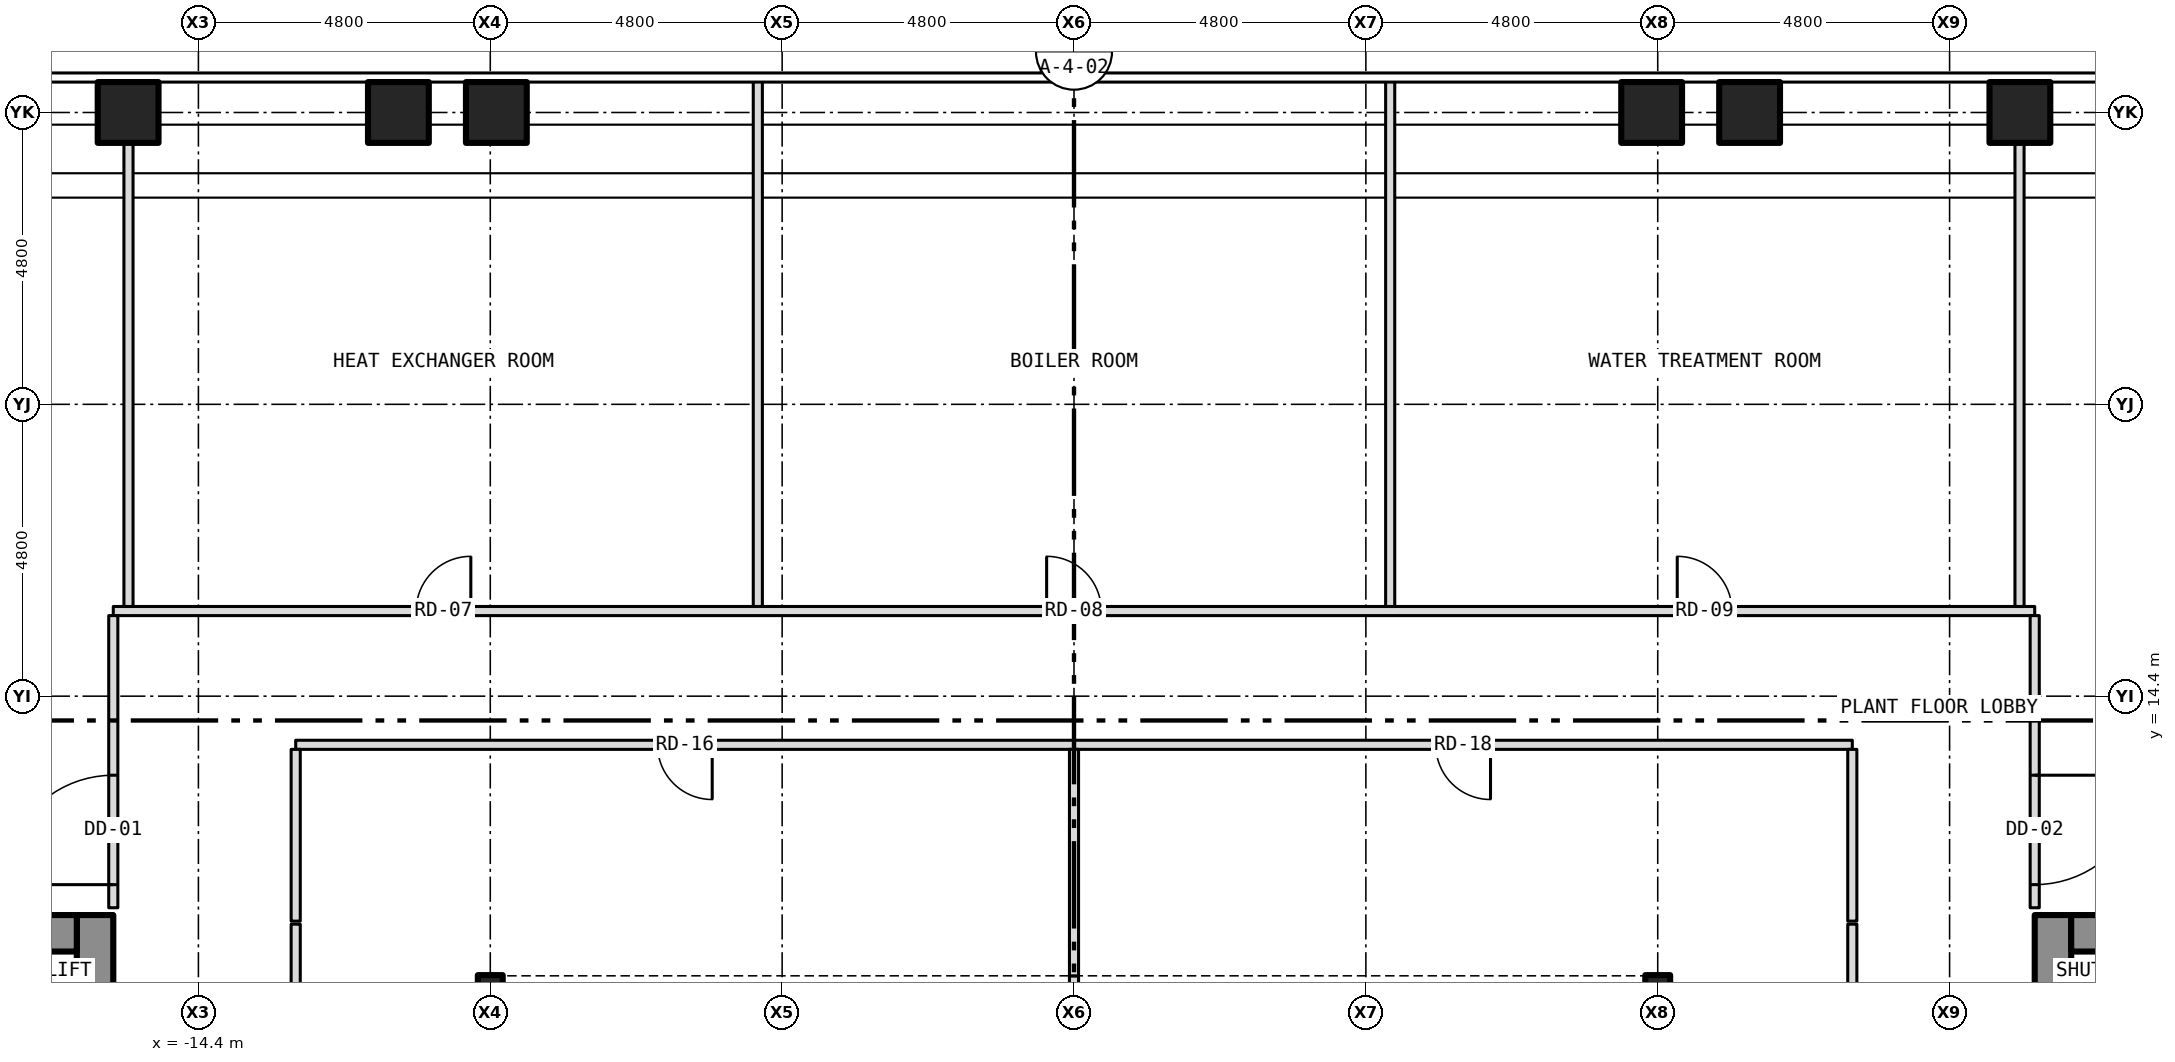
"""IFC4 building model, lengths in metres.
Left out: names, types, materials, properties, quantities, classifications, styles, units other than length and angle.
Written with IfcOpenShell. Run it as: python <this file> out.ifc"""

import sys

from ifc_helpers import new_model, si_unit, direction, frame, frame_2d, origin, origin_2d, place, context, subcontext, project, spatial, rectangle, hollow_rectangle, i_section, extrude, element, fill, save


model = new_model("IFC4")
c1 = context("Model", 3, precision=1e-05, world=origin(), true_north=direction((0.0, 1.0)))
c2 = subcontext(c1, "Body", "Model", "MODEL_VIEW")
j1 = project(units=[si_unit("LENGTHUNIT", "METRE"), si_unit("PLANEANGLEUNIT", "RADIAN")], contexts=[c1])
p1 = place(None, origin())
s1 = spatial("IfcSite", under=j1, at=p1, CompositionType="ELEMENT")
p2 = place(p1, origin())
s2 = spatial("IfcBuilding", under=s1, at=p2, CompositionType="ELEMENT")
p3 = place(p2, frame((0.0, 0.0, 84.5)))
s3 = spatial("IfcBuildingStorey", under=s2, at=p3, CompositionType="ELEMENT", Elevation=84.5)
for number, where, z_axis, x_axis in (
    (1, (-15.556, 24.0, -0.3), (0.0, 0.0, 1.0), (1.0, 0.0, 0.0)),
    (2, (-11.111, 24.0, -0.3), (0.0, 0.0, 1.0), (1.0, 0.0, 0.0)),
    (3, (11.111, 24.0, -0.3), (0.0, 0.0, 1.0), (1.0, 0.0, 0.0)),
    (4, (15.556, 24.0, -0.3), (0.0, 0.0, 1.0), (1.0, 0.0, 0.0)),
    (5, (-9.5, 24.0, -0.3), (0.0, 0.0, 1.0), (1.0, 0.0, 0.0)),
    (6, (9.5, 24.0, -0.3), (0.0, 0.0, 1.0), (1.0, 0.0, 0.0)),
):
    element("IfcColumn", number, at=place(p3, frame(where, z_axis=z_axis, x_axis=x_axis)), inside=s3, PredefinedType="COLUMN", context=c2, shape_type="SweptSolid", body=[
        extrude(hollow_rectangle(XDim=1.0, YDim=1.0, WallThickness=0.06, at=origin_2d()), origin(), (0.0, 0.0, 1.0), 4.65),
    ])
for number, where, z_axis, x_axis in (
    (7, (-9.6, 9.6, -0.3), (0.0, 0.0, 1.0), (1.0, 0.0, 0.0)),
    (8, (9.6, 9.6, -0.3), (0.0, 0.0, 1.0), (1.0, 0.0, 0.0)),
):
    element("IfcColumn", number, at=place(p3, frame(where, z_axis=z_axis, x_axis=x_axis)), inside=s3, PredefinedType="COLUMN", context=c2, shape_type="SweptSolid", body=[
        extrude(i_section(OverallWidth=0.409, OverallDepth=0.424, WebThickness=0.033, FlangeThickness=0.052, at=origin_2d()), origin(), (0.0, 0.0, 1.0), 4.65),
    ])
p4 = place(p3, frame((16.1, -10.8, 0.0), z_axis=(0.0, 0.0, 1.0), x_axis=(0.0, 1.0, 0.0)))
e9 = element("IfcWall", 9, at=p4, inside=s3, PredefinedType="SHEAR", context=c2, shape_type="SweptSolid", body=[
    extrude(rectangle(XDim=21.6, YDim=0.6, at=frame_2d((10.8, 0.0))), origin(), (0.0, 0.0, 1.0), 3.9),
])
p5 = place(p4, frame((9.4, 0.0, 0.0)))
e10 = element("IfcOpeningElement", 10, at=p5, cuts=e9, PredefinedType="OPENING", context=c2, shape_type="SweptSolid", body=[
    extrude(rectangle(XDim=1.1, YDim=2.1, at=frame_2d((0.55, 1.05))), frame((0.0, 0.312, 0.0), z_axis=(0.0, -1.0, 0.0), x_axis=(1.0, 0.0, 0.0)), (0.0, 0.0, 1.0), 0.624),
])
p6 = place(p4, frame((11.5, 0.0, 0.0)))
e11 = element("IfcOpeningElement", 11, at=p6, cuts=e9, PredefinedType="OPENING", context=c2, shape_type="SweptSolid", body=[
    extrude(rectangle(XDim=1.1, YDim=2.1, at=frame_2d((0.55, 1.05))), frame((0.0, 0.312, 0.0), z_axis=(0.0, -1.0, 0.0), x_axis=(1.0, 0.0, 0.0)), (0.0, 0.0, 1.0), 0.624),
])
p7 = place(p4, frame((13.6, 0.0, 0.0)))
e12 = element("IfcOpeningElement", 12, at=p7, cuts=e9, PredefinedType="OPENING", context=c2, shape_type="SweptSolid", body=[
    extrude(rectangle(XDim=1.1, YDim=2.1, at=frame_2d((0.55, 1.05))), frame((0.0, 0.312, 0.0), z_axis=(0.0, -1.0, 0.0), x_axis=(1.0, 0.0, 0.0)), (0.0, 0.0, 1.0), 0.624),
])
p8 = place(p4, frame((15.7, 0.0, 0.0)))
e13 = element("IfcOpeningElement", 13, at=p8, cuts=e9, PredefinedType="OPENING", context=c2, shape_type="SweptSolid", body=[
    extrude(rectangle(XDim=1.1, YDim=2.1, at=frame_2d((0.55, 1.05))), frame((0.0, 0.312, 0.0), z_axis=(0.0, -1.0, 0.0), x_axis=(1.0, 0.0, 0.0)), (0.0, 0.0, 1.0), 0.624),
])
p9 = place(p4, frame((17.8, 0.0, 0.0)))
e14 = element("IfcOpeningElement", 14, at=p9, cuts=e9, PredefinedType="OPENING", context=c2, shape_type="SweptSolid", body=[
    extrude(rectangle(XDim=1.1, YDim=2.1, at=frame_2d((0.55, 1.05))), frame((0.0, 0.312, 0.0), z_axis=(0.0, -1.0, 0.0), x_axis=(1.0, 0.0, 0.0)), (0.0, 0.0, 1.0), 0.624),
])
p10 = place(p4, frame((5.642, 0.0, 0.0)))
e15 = element("IfcOpeningElement", 15, at=p10, cuts=e9, PredefinedType="OPENING", context=c2, shape_type="SweptSolid", body=[
    extrude(rectangle(XDim=1.1, YDim=2.1, at=frame_2d((0.55, 1.05))), frame((0.0, 0.312, 0.0), z_axis=(0.0, -1.0, 0.0), x_axis=(1.0, 0.0, 0.0)), (0.0, 0.0, 1.0), 0.624),
])
p11 = place(p4, frame((7.5, 0.0, 0.0)))
e16 = element("IfcOpeningElement", 16, at=p11, cuts=e9, PredefinedType="OPENING", context=c2, shape_type="SweptSolid", body=[
    extrude(rectangle(XDim=1.1, YDim=2.1, at=frame_2d((0.55, 1.05))), frame((0.0, 0.312, 0.0), z_axis=(0.0, -1.0, 0.0), x_axis=(1.0, 0.0, 0.0)), (0.0, 0.0, 1.0), 0.624),
])
p12 = place(p3, frame((16.4, 10.5, 0.0), z_axis=(0.0, 0.0, 1.0), x_axis=(1.0, 0.0, 0.0)))
e17 = element("IfcWall", 17, at=p12, inside=s3, PredefinedType="SHEAR", context=c2, shape_type="SweptSolid", body=[
    extrude(rectangle(XDim=7.0, YDim=0.6, at=frame_2d((3.5, 0.0))), origin(), (0.0, 0.0, 1.0), 3.9),
])
p13 = place(p3, frame((-16.1, -10.8, 0.0), z_axis=(0.0, 0.0, 1.0), x_axis=(0.0, 1.0, 0.0)))
e18 = element("IfcWall", 18, at=p13, inside=s3, PredefinedType="SHEAR", context=c2, shape_type="SweptSolid", body=[
    extrude(rectangle(XDim=21.6, YDim=0.6, at=frame_2d((10.8, 0.0))), origin(), (0.0, 0.0, 1.0), 3.9),
])
p14 = place(p13, frame((9.4, 0.0, 0.0)))
e19 = element("IfcOpeningElement", 19, at=p14, cuts=e18, PredefinedType="OPENING", context=c2, shape_type="SweptSolid", body=[
    extrude(rectangle(XDim=1.1, YDim=2.1, at=frame_2d((0.55, 1.05))), frame((0.0, 0.312, 0.0), z_axis=(0.0, -1.0, 0.0), x_axis=(1.0, 0.0, 0.0)), (0.0, 0.0, 1.0), 0.624),
])
p15 = place(p13, frame((11.5, 0.0, 0.0)))
e20 = element("IfcOpeningElement", 20, at=p15, cuts=e18, PredefinedType="OPENING", context=c2, shape_type="SweptSolid", body=[
    extrude(rectangle(XDim=1.1, YDim=2.1, at=frame_2d((0.55, 1.05))), frame((0.0, 0.312, 0.0), z_axis=(0.0, -1.0, 0.0), x_axis=(1.0, 0.0, 0.0)), (0.0, 0.0, 1.0), 0.624),
])
p16 = place(p13, frame((13.6, 0.0, 0.0)))
e21 = element("IfcOpeningElement", 21, at=p16, cuts=e18, PredefinedType="OPENING", context=c2, shape_type="SweptSolid", body=[
    extrude(rectangle(XDim=1.1, YDim=2.1, at=frame_2d((0.55, 1.05))), frame((0.0, 0.312, 0.0), z_axis=(0.0, -1.0, 0.0), x_axis=(1.0, 0.0, 0.0)), (0.0, 0.0, 1.0), 0.624),
])
p17 = place(p13, frame((15.7, 0.0, 0.0)))
e22 = element("IfcOpeningElement", 22, at=p17, cuts=e18, PredefinedType="OPENING", context=c2, shape_type="SweptSolid", body=[
    extrude(rectangle(XDim=1.1, YDim=2.1, at=frame_2d((0.55, 1.05))), frame((0.0, 0.312, 0.0), z_axis=(0.0, -1.0, 0.0), x_axis=(1.0, 0.0, 0.0)), (0.0, 0.0, 1.0), 0.624),
])
p18 = place(p13, frame((17.8, 0.0, 0.0)))
e23 = element("IfcOpeningElement", 23, at=p18, cuts=e18, PredefinedType="OPENING", context=c2, shape_type="SweptSolid", body=[
    extrude(rectangle(XDim=1.1, YDim=2.1, at=frame_2d((0.55, 1.05))), frame((0.0, 0.312, 0.0), z_axis=(0.0, -1.0, 0.0), x_axis=(1.0, 0.0, 0.0)), (0.0, 0.0, 1.0), 0.624),
])
p19 = place(p13, frame((0.758, 0.0, 0.0)))
e24 = element("IfcOpeningElement", 24, at=p19, cuts=e18, PredefinedType="OPENING", context=c2, shape_type="SweptSolid", body=[
    extrude(rectangle(XDim=1.1, YDim=2.1, at=frame_2d((0.55, 1.05))), frame((0.0, 0.312, 0.0), z_axis=(0.0, -1.0, 0.0), x_axis=(1.0, 0.0, 0.0)), (0.0, 0.0, 1.0), 0.624),
])
p20 = place(p13, frame((7.5, 0.0, 0.0)))
e25 = element("IfcOpeningElement", 25, at=p20, cuts=e18, PredefinedType="OPENING", context=c2, shape_type="SweptSolid", body=[
    extrude(rectangle(XDim=1.1, YDim=2.1, at=frame_2d((0.55, 1.05))), frame((0.0, 0.312, 0.0), z_axis=(0.0, -1.0, 0.0), x_axis=(1.0, 0.0, 0.0)), (0.0, 0.0, 1.0), 0.624),
])
p21 = place(p3, frame((-23.4, 10.5, 0.0), z_axis=(0.0, 0.0, 1.0), x_axis=(1.0, 0.0, 0.0)))
e26 = element("IfcWall", 26, at=p21, inside=s3, PredefinedType="SHEAR", context=c2, shape_type="SweptSolid", body=[
    extrude(rectangle(XDim=7.0, YDim=0.6, at=frame_2d((3.5, 0.0))), origin(), (0.0, 0.0, 1.0), 3.9),
])
p22 = place(p3, frame((-12.8, 13.6, 0.0), z_axis=(0.0, 0.0, 1.0), x_axis=(1.0, 0.0, 0.0)))
e27 = element("IfcWall", 27, at=p22, inside=s3, PredefinedType="PARTITIONING", context=c2, shape_type="SweptSolid", body=[
    extrude(rectangle(XDim=25.6, YDim=0.15, at=frame_2d((12.8, 0.0))), origin(), (0.0, 0.0, 1.0), 4.35),
])
p23 = place(p22, frame((5.95, 0.0, 0.0)))
e28 = element("IfcOpeningElement", 28, at=p23, cuts=e27, PredefinedType="OPENING", context=c2, shape_type="SweptSolid", body=[
    extrude(rectangle(XDim=0.9, YDim=2.1, at=frame_2d((0.45, 1.05))), frame((0.0, 0.087, 0.0), z_axis=(0.0, -1.0, 0.0), x_axis=(1.0, 0.0, 0.0)), (0.0, 0.0, 1.0), 0.174),
])
p24 = place(p22, frame((18.75, 0.0, 0.0)))
e29 = element("IfcOpeningElement", 29, at=p24, cuts=e27, PredefinedType="OPENING", context=c2, shape_type="SweptSolid", body=[
    extrude(rectangle(XDim=0.9, YDim=2.1, at=frame_2d((0.45, 1.05))), frame((0.0, 0.087, 0.0), z_axis=(0.0, -1.0, 0.0), x_axis=(1.0, 0.0, 0.0)), (0.0, 0.0, 1.0), 0.174),
])
p25 = place(p3, frame((-15.8, 15.8, 0.0), z_axis=(0.0, 0.0, 1.0), x_axis=(1.0, 0.0, 0.0)))
e30 = element("IfcWall", 30, at=p25, inside=s3, PredefinedType="PARTITIONING", context=c2, shape_type="SweptSolid", body=[
    extrude(rectangle(XDim=31.6, YDim=0.15, at=frame_2d((15.8, 0.0))), origin(), (0.0, 0.0, 1.0), 4.35),
])
p26 = place(p25, frame((4.98, 0.0, 0.0)))
e31 = element("IfcOpeningElement", 31, at=p26, cuts=e30, PredefinedType="OPENING", context=c2, shape_type="SweptSolid", body=[
    extrude(rectangle(XDim=0.9, YDim=2.1, at=frame_2d((0.45, 1.05))), frame((0.0, 0.087, 0.0), z_axis=(0.0, -1.0, 0.0), x_axis=(1.0, 0.0, 0.0)), (0.0, 0.0, 1.0), 0.174),
])
p27 = place(p25, frame((15.35, 0.0, 0.0)))
e32 = element("IfcOpeningElement", 32, at=p27, cuts=e30, PredefinedType="OPENING", context=c2, shape_type="SweptSolid", body=[
    extrude(rectangle(XDim=0.9, YDim=2.1, at=frame_2d((0.45, 1.05))), frame((0.0, 0.087, 0.0), z_axis=(0.0, -1.0, 0.0), x_axis=(1.0, 0.0, 0.0)), (0.0, 0.0, 1.0), 0.174),
])
p28 = place(p25, frame((25.721, 0.0, 0.0)))
e33 = element("IfcOpeningElement", 33, at=p28, cuts=e30, PredefinedType="OPENING", context=c2, shape_type="SweptSolid", body=[
    extrude(rectangle(XDim=0.9, YDim=2.1, at=frame_2d((0.45, 1.05))), frame((0.0, 0.087, 0.0), z_axis=(0.0, -1.0, 0.0), x_axis=(1.0, 0.0, 0.0)), (0.0, 0.0, 1.0), 0.174),
])
p29 = place(p3, frame((-15.8, 10.92, 0.0), z_axis=(0.0, 0.0, 1.0), x_axis=(0.0, 1.0, 0.0)))
e34 = element("IfcWall", 34, at=p29, inside=s3, PredefinedType="PARTITIONING", context=c2, shape_type="SweptSolid", body=[
    extrude(rectangle(XDim=4.805, YDim=0.15, at=frame_2d((2.403, 0.0))), origin(), (0.0, 0.0, 1.0), 4.35),
])
p30 = place(p29, frame((0.38, 0.0, 0.0)))
e35 = element("IfcOpeningElement", 35, at=p30, cuts=e34, PredefinedType="OPENING", context=c2, shape_type="SweptSolid", body=[
    extrude(rectangle(XDim=1.8, YDim=2.1, at=frame_2d((0.9, 1.05))), frame((0.0, 0.087, 0.0), z_axis=(0.0, -1.0, 0.0), x_axis=(1.0, 0.0, 0.0)), (0.0, 0.0, 1.0), 0.174),
])
p31 = place(p3, frame((-15.55, 15.875, 0.0), z_axis=(0.0, 0.0, 1.0), x_axis=(0.0, 1.0, 0.0)))
e36 = element("IfcWall", 36, at=p31, inside=s3, PredefinedType="PARTITIONING", context=c2, shape_type="SweptSolid", body=[
    extrude(rectangle(XDim=8.005, YDim=0.15, at=frame_2d((4.002, 0.0))), origin(), (0.0, 0.0, 1.0), 4.35),
])
p32 = place(p3, frame((-12.8, 2.4, 0.0), z_axis=(0.0, 0.0, 1.0), x_axis=(0.0, 1.0, 0.0)))
e37 = element("IfcWall", 37, at=p32, inside=s3, PredefinedType="PARTITIONING", context=c2, shape_type="SweptSolid", body=[
    extrude(rectangle(XDim=8.25, YDim=0.15, at=frame_2d((4.125, 0.0))), origin(), (0.0, 0.0, 1.0), 4.35),
])
p33 = place(p3, frame((-12.8, 10.7, 0.0), z_axis=(0.0, 0.0, 1.0), x_axis=(0.0, 1.0, 0.0)))
e38 = element("IfcWall", 38, at=p33, inside=s3, PredefinedType="PARTITIONING", context=c2, shape_type="SweptSolid", body=[
    extrude(rectangle(XDim=2.825, YDim=0.15, at=frame_2d((1.413, 0.0))), origin(), (0.0, 0.0, 1.0), 4.35),
])
p34 = place(p3, frame((-5.2, 15.875, 0.0), z_axis=(0.0, 0.0, 1.0), x_axis=(0.0, 1.0, 0.0)))
e39 = element("IfcWall", 39, at=p34, inside=s3, PredefinedType="PARTITIONING", context=c2, shape_type="SweptSolid", body=[
    extrude(rectangle(XDim=8.655, YDim=0.15, at=frame_2d((4.328, 0.0))), origin(), (0.0, 0.0, 1.0), 4.35),
])
p35 = place(p3, frame((0.0, 9.399, 0.0), z_axis=(0.0, 0.0, 1.0), x_axis=(0.0, 1.0, 0.0)))
e40 = element("IfcWall", 40, at=p35, inside=s3, PredefinedType="PARTITIONING", context=c2, shape_type="SweptSolid", body=[
    extrude(rectangle(XDim=0.401, YDim=0.15, at=frame_2d((0.201, 0.0))), origin(), (0.0, 0.0, 1.0), 4.35),
])
p36 = place(p3, frame((0.0, 9.8, 0.0), z_axis=(0.0, 0.0, 1.0), x_axis=(0.0, 1.0, 0.0)))
e41 = element("IfcWall", 41, at=p36, inside=s3, PredefinedType="PARTITIONING", context=c2, shape_type="SweptSolid", body=[
    extrude(rectangle(XDim=3.725, YDim=0.15, at=frame_2d((1.862, 0.0))), origin(), (0.0, 0.0, 1.0), 3.728),
])
p37 = place(p3, frame((5.2, 15.875, 0.0), z_axis=(0.0, 0.0, 1.0), x_axis=(0.0, 1.0, 0.0)))
e42 = element("IfcWall", 42, at=p37, inside=s3, PredefinedType="PARTITIONING", context=c2, shape_type="SweptSolid", body=[
    extrude(rectangle(XDim=8.655, YDim=0.15, at=frame_2d((4.328, 0.0))), origin(), (0.0, 0.0, 1.0), 4.35),
])
p38 = place(p3, frame((12.8, 2.4, 0.0), z_axis=(0.0, 0.0, 1.0), x_axis=(0.0, 1.0, 0.0)))
e43 = element("IfcWall", 43, at=p38, inside=s3, PredefinedType="PARTITIONING", context=c2, shape_type="SweptSolid", body=[
    extrude(rectangle(XDim=8.25, YDim=0.15, at=frame_2d((4.125, 0.0))), origin(), (0.0, 0.0, 1.0), 4.35),
])
p39 = place(p3, frame((12.8, 10.7, 0.0), z_axis=(0.0, 0.0, 1.0), x_axis=(0.0, 1.0, 0.0)))
e44 = element("IfcWall", 44, at=p39, inside=s3, PredefinedType="PARTITIONING", context=c2, shape_type="SweptSolid", body=[
    extrude(rectangle(XDim=2.825, YDim=0.15, at=frame_2d((1.413, 0.0))), origin(), (0.0, 0.0, 1.0), 4.35),
])
p40 = place(p3, frame((15.55, 15.875, 0.0), z_axis=(0.0, 0.0, 1.0), x_axis=(0.0, 1.0, 0.0)))
e45 = element("IfcWall", 45, at=p40, inside=s3, PredefinedType="PARTITIONING", context=c2, shape_type="SweptSolid", body=[
    extrude(rectangle(XDim=8.005, YDim=0.15, at=frame_2d((4.002, 0.0))), origin(), (0.0, 0.0, 1.0), 4.35),
])
p41 = place(p3, frame((15.8, 10.92, 0.0), z_axis=(0.0, 0.0, 1.0), x_axis=(0.0, 1.0, 0.0)))
e46 = element("IfcWall", 46, at=p41, inside=s3, PredefinedType="PARTITIONING", context=c2, shape_type="SweptSolid", body=[
    extrude(rectangle(XDim=4.805, YDim=0.15, at=frame_2d((2.403, 0.0))), origin(), (0.0, 0.0, 1.0), 4.35),
])
p42 = place(p41, frame((0.38, 0.0, 0.0)))
e47 = element("IfcOpeningElement", 47, at=p42, cuts=e46, PredefinedType="OPENING", context=c2, shape_type="SweptSolid", body=[
    extrude(rectangle(XDim=1.8, YDim=2.1, at=frame_2d((0.9, 1.05))), frame((0.0, 0.087, 0.0), z_axis=(0.0, -1.0, 0.0), x_axis=(1.0, 0.0, 0.0)), (0.0, 0.0, 1.0), 0.174),
])
p43 = place(p26, origin())
e48 = element("IfcDoor", 48, at=p43, inside=s3, OperationType="SINGLE_SWING_RIGHT", PredefinedType="DOOR", context=c2, shape_type="SweptSolid", body=[
    extrude(rectangle(XDim=0.9, YDim=2.1, at=frame_2d((0.45, 1.05))), frame((0.0, 0.025, 0.0), z_axis=(0.0, -1.0, 0.0), x_axis=(1.0, 0.0, 0.0)), (0.0, 0.0, 1.0), 0.05),
])
fill(e31, e48)
p44 = place(p27, origin())
e49 = element("IfcDoor", 49, at=p44, inside=s3, OperationType="SINGLE_SWING_LEFT", PredefinedType="DOOR", context=c2, shape_type="SweptSolid", body=[
    extrude(rectangle(XDim=0.9, YDim=2.1, at=frame_2d((0.45, 1.05))), frame((0.0, 0.025, 0.0), z_axis=(0.0, -1.0, 0.0), x_axis=(1.0, 0.0, 0.0)), (0.0, 0.0, 1.0), 0.05),
])
fill(e32, e49)
p45 = place(p28, origin())
e50 = element("IfcDoor", 50, at=p45, inside=s3, OperationType="SINGLE_SWING_LEFT", PredefinedType="DOOR", context=c2, shape_type="SweptSolid", body=[
    extrude(rectangle(XDim=0.9, YDim=2.1, at=frame_2d((0.45, 1.05))), frame((0.0, 0.025, 0.0), z_axis=(0.0, -1.0, 0.0), x_axis=(1.0, 0.0, 0.0)), (0.0, 0.0, 1.0), 0.05),
])
fill(e33, e50)
p46 = place(p30, origin())
e51 = element("IfcDoor", 51, at=p46, inside=s3, OperationType="DOUBLE_DOOR_SINGLE_SWING", PredefinedType="DOOR", context=c2, shape_type="SweptSolid", body=[
    extrude(rectangle(XDim=1.8, YDim=2.1, at=frame_2d((0.9, 1.05))), frame((0.0, 0.025, 0.0), z_axis=(0.0, -1.0, 0.0), x_axis=(1.0, 0.0, 0.0)), (0.0, 0.0, 1.0), 0.05),
])
fill(e35, e51)
p47 = place(p42, origin())
e52 = element("IfcDoor", 52, at=p47, inside=s3, OperationType="DOUBLE_DOOR_SINGLE_SWING", PredefinedType="DOOR", context=c2, shape_type="SweptSolid", body=[
    extrude(rectangle(XDim=1.8, YDim=2.1, at=frame_2d((0.9, 1.05))), frame((0.0, 0.025, 0.0), z_axis=(0.0, -1.0, 0.0), x_axis=(1.0, 0.0, 0.0)), (0.0, 0.0, 1.0), 0.05),
])
fill(e47, e52)
p48 = place(p23, origin())
e53 = element("IfcDoor", 53, at=p48, inside=s3, OperationType="SINGLE_SWING_RIGHT", PredefinedType="DOOR", context=c2, shape_type="SweptSolid", body=[
    extrude(rectangle(XDim=0.9, YDim=2.1, at=frame_2d((0.45, 1.05))), frame((0.0, 0.025, 0.0), z_axis=(0.0, -1.0, 0.0), x_axis=(1.0, 0.0, 0.0)), (0.0, 0.0, 1.0), 0.05),
])
fill(e28, e53)
p49 = place(p24, origin())
e54 = element("IfcDoor", 54, at=p49, inside=s3, OperationType="SINGLE_SWING_RIGHT", PredefinedType="DOOR", context=c2, shape_type="SweptSolid", body=[
    extrude(rectangle(XDim=0.9, YDim=2.1, at=frame_2d((0.45, 1.05))), frame((0.0, 0.025, 0.0), z_axis=(0.0, -1.0, 0.0), x_axis=(1.0, 0.0, 0.0)), (0.0, 0.0, 1.0), 0.05),
])
fill(e29, e54)
save(model, sys.argv[1])
